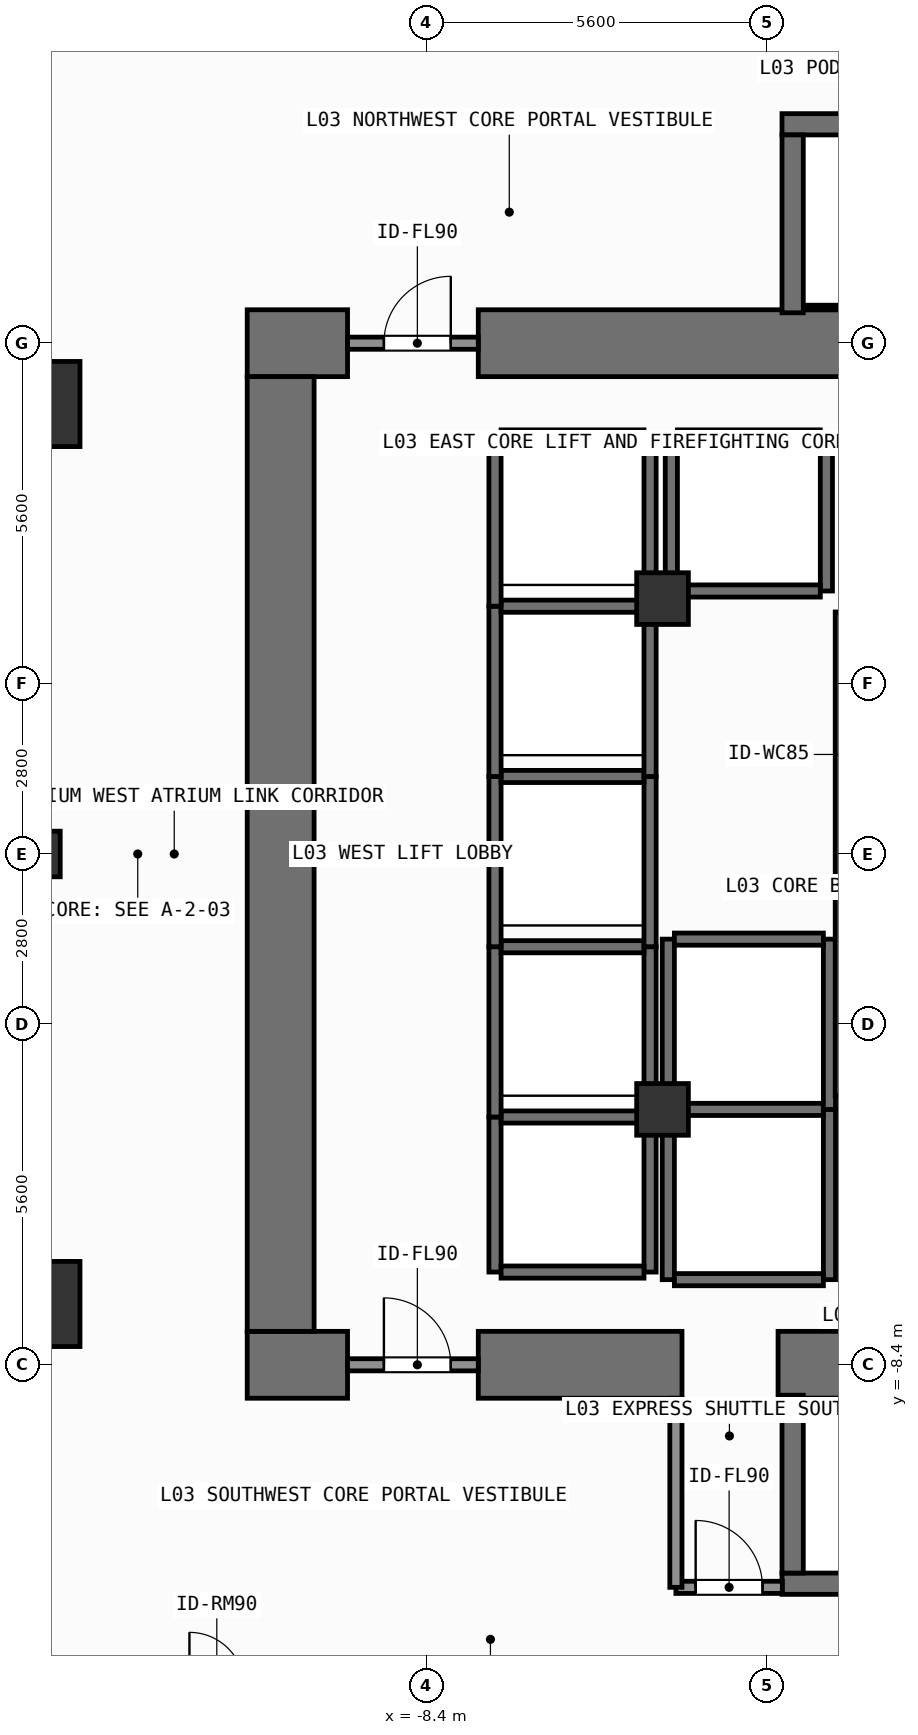
"""IFC4 building model, lengths in metres.
Left out: names, types, materials, properties, quantities, classifications, styles, units other than length and angle.
Written with IfcOpenShell. Run it as: python <this file> out.ifc"""

import sys

from ifc_helpers import new_model, si_unit, direction, frame, frame_2d, origin, origin_2d, place, context, subcontext, project, spatial, rectangle, extrude, element, fill, save


model = new_model("IFC4")
c1 = context("Model", 3, precision=1e-05, world=origin(), true_north=direction((0.0, 1.0)))
c2 = subcontext(c1, "Body", "Model", "MODEL_VIEW")
j1 = project(units=[si_unit("LENGTHUNIT", "METRE"), si_unit("PLANEANGLEUNIT", "RADIAN")], contexts=[c1])
p1 = place(None, origin())
s1 = spatial("IfcSite", under=j1, at=p1, CompositionType="ELEMENT")
p2 = place(p1, origin())
s2 = spatial("IfcBuilding", under=s1, at=p2, CompositionType="ELEMENT")
p3 = place(p2, frame((0.0, 0.0, 9.0)))
s3 = spatial("IfcBuildingStorey", under=s2, at=p3, CompositionType="ELEMENT", Elevation=9.0)
p4 = place(p3, frame((-11.35, -8.4, 0.0), z_axis=(0.0, 0.0, 1.0), x_axis=(1.0, 0.0, 0.0)))
e1 = element("IfcWall", 1, at=p4, inside=s3, PredefinedType="SHEAR", context=c2, shape_type="SweptSolid", body=[
    extrude(rectangle(XDim=1.65, YDim=1.1, at=frame_2d((0.825, 0.0))), origin(), (0.0, 0.0, 1.0), 4.2),
])
p5 = place(p3, frame((-7.55, -8.4, 0.0), z_axis=(0.0, 0.0, 1.0), x_axis=(1.0, 0.0, 0.0)))
e2 = element("IfcWall", 2, at=p5, inside=s3, PredefinedType="SHEAR", context=c2, shape_type="SweptSolid", body=[
    extrude(rectangle(XDim=3.35, YDim=1.1, at=frame_2d((1.675, 0.0))), origin(), (0.0, 0.0, 1.0), 4.2),
])
p6 = place(p3, frame((-2.62, -8.4, 0.0), z_axis=(0.0, 0.0, 1.0), x_axis=(1.0, 0.0, 0.0)))
e3 = element("IfcWall", 3, at=p6, inside=s3, PredefinedType="SHEAR", context=c2, shape_type="SweptSolid", body=[
    extrude(rectangle(XDim=7.27, YDim=1.1, at=frame_2d((3.635, 0.0))), origin(), (0.0, 0.0, 1.0), 4.2),
])
p7 = place(p3, frame((-11.35, 8.4, 0.0), z_axis=(0.0, 0.0, 1.0), x_axis=(1.0, 0.0, 0.0)))
e4 = element("IfcWall", 4, at=p7, inside=s3, PredefinedType="SHEAR", context=c2, shape_type="SweptSolid", body=[
    extrude(rectangle(XDim=1.65, YDim=1.1, at=frame_2d((0.825, 0.0))), origin(), (0.0, 0.0, 1.0), 4.2),
])
p8 = place(p3, frame((-7.55, 8.4, 0.0), z_axis=(0.0, 0.0, 1.0), x_axis=(1.0, 0.0, 0.0)))
e5 = element("IfcWall", 5, at=p8, inside=s3, PredefinedType="SHEAR", context=c2, shape_type="SweptSolid", body=[
    extrude(rectangle(XDim=16.5, YDim=1.1, at=frame_2d((8.25, 0.0))), origin(), (0.0, 0.0, 1.0), 4.2),
])
p9 = place(p3, frame((-10.8, -7.85, 0.0), z_axis=(0.0, 0.0, 1.0), x_axis=(0.0, 1.0, 0.0)))
e6 = element("IfcWall", 6, at=p9, inside=s3, PredefinedType="SHEAR", context=c2, shape_type="SweptSolid", body=[
    extrude(rectangle(XDim=15.7, YDim=1.1, at=frame_2d((7.85, 0.0))), origin(), (0.0, 0.0, 1.0), 4.2),
])
p10 = place(p3, frame((-2.555, -12.0, 0.0), z_axis=(0.0, 0.0, 1.0), x_axis=(1.0, 0.0, 0.0)))
e7 = element("IfcWall", 7, at=p10, inside=s3, PredefinedType="SHEAR", context=c2, shape_type="SweptSolid", body=[
    extrude(rectangle(XDim=7.31, YDim=0.35, at=frame_2d((3.655, 0.0))), origin(), (0.0, 0.0, 1.0), 4.2),
])
p11 = place(p3, frame((-2.2, -8.988, 0.0), z_axis=(0.0, 0.0, 1.0), x_axis=(1.0, 0.0, 0.0)))
e8 = element("IfcWall", 8, at=p11, inside=s3, PredefinedType="SHEAR", context=c2, shape_type="SweptSolid", body=[
    extrude(rectangle(XDim=6.6, YDim=0.075, at=frame_2d((3.3, 0.0))), origin(), (0.0, 0.0, 1.0), 4.2),
])
p12 = place(p3, frame((-2.38, -11.825, 0.0), z_axis=(0.0, 0.0, 1.0), x_axis=(0.0, 1.0, 0.0)))
e9 = element("IfcWall", 9, at=p12, inside=s3, PredefinedType="SHEAR", context=c2, shape_type="SweptSolid", body=[
    extrude(rectangle(XDim=2.925, YDim=0.35, at=frame_2d((1.462, 0.0))), origin(), (0.0, 0.0, 1.0), 4.2),
])
p13 = place(p3, frame((-2.555, 12.0, 0.0), z_axis=(0.0, 0.0, 1.0), x_axis=(1.0, 0.0, 0.0)))
e10 = element("IfcWall", 10, at=p13, inside=s3, PredefinedType="SHEAR", context=c2, shape_type="SweptSolid", body=[
    extrude(rectangle(XDim=7.31, YDim=0.35, at=frame_2d((3.655, 0.0))), origin(), (0.0, 0.0, 1.0), 4.2),
])
p14 = place(p3, frame((-2.2, 8.988, 0.0), z_axis=(0.0, 0.0, 1.0), x_axis=(1.0, 0.0, 0.0)))
e11 = element("IfcWall", 11, at=p14, inside=s3, PredefinedType="SHEAR", context=c2, shape_type="SweptSolid", body=[
    extrude(rectangle(XDim=6.6, YDim=0.075, at=frame_2d((3.3, 0.0))), origin(), (0.0, 0.0, 1.0), 4.2),
])
p15 = place(p3, frame((-2.38, 8.9, 0.0), z_axis=(0.0, 0.0, 1.0), x_axis=(0.0, 1.0, 0.0)))
e12 = element("IfcWall", 12, at=p15, inside=s3, PredefinedType="SHEAR", context=c2, shape_type="SweptSolid", body=[
    extrude(rectangle(XDim=2.925, YDim=0.35, at=frame_2d((1.462, 0.0))), origin(), (0.0, 0.0, 1.0), 4.2),
])
for number, where, z_axis, x_axis in (
    (13, (-14.8, -7.4, 0.0), (0.0, 0.0, 1.0), (1.0, 0.0, 0.0)),
    (14, (-14.8, 7.4, 0.0), (0.0, 0.0, 1.0), (1.0, 0.0, 0.0)),
):
    element("IfcColumn", number, at=place(p3, frame(where, z_axis=z_axis, x_axis=x_axis)), inside=s3, PredefinedType="COLUMN", context=c2, shape_type="SweptSolid", body=[
        extrude(rectangle(XDim=1.4, YDim=1.4, at=origin_2d()), origin(), (0.0, 0.0, 1.0), 4.2),
    ])
for number, where, z_axis, x_axis in (
    (15, (-4.52, -4.2, 0.0), (0.0, 0.0, 1.0), (1.0, 0.0, 0.0)),
    (16, (-4.52, 4.2, 0.0), (0.0, 0.0, 1.0), (1.0, 0.0, 0.0)),
):
    element("IfcColumn", number, at=place(p3, frame(where, z_axis=z_axis, x_axis=x_axis)), inside=s3, PredefinedType="COLUMN", context=c2, shape_type="SweptSolid", body=[
        extrude(rectangle(XDim=0.85, YDim=0.85, at=origin_2d()), origin(), (0.0, 0.0, 1.0), 4.2),
    ])
p16 = place(p3, frame((-14.8, 0.0, 0.0), z_axis=(0.0, 0.0, 1.0), x_axis=(1.0, 0.0, 0.0)))
e17 = element("IfcColumn", 17, at=p16, inside=s3, PredefinedType="COLUMN", context=c2, shape_type="SweptSolid", body=[
    extrude(rectangle(XDim=0.75, YDim=0.75, at=origin_2d()), origin(), (0.0, 0.0, 1.0), 4.2),
])
for number, where, z_axis, x_axis in (
    (18, (-7.275, -6.875, 0.0), (0.0, 0.0, 1.0), (0.0, 1.0, 0.0)),
    (19, (-4.725, -6.875, 0.0), (0.0, 0.0, 1.0), (0.0, 1.0, 0.0)),
):
    element("IfcWall", number, at=place(p3, frame(where, z_axis=z_axis, x_axis=x_axis)), inside=s3, PredefinedType="SHEAR", context=c2, shape_type="SweptSolid", body=[
        extrude(rectangle(XDim=2.55, YDim=0.2, at=frame_2d((1.275, 0.0))), origin(), (0.0, 0.0, 1.0), 3.96),
    ])
for number, where, z_axis, x_axis in (
    (20, (-7.175, -6.875, 0.0), (0.0, 0.0, 1.0), (1.0, 0.0, 0.0)),
    (21, (-7.175, -4.325, 0.0), (0.0, 0.0, 1.0), (1.0, 0.0, 0.0)),
):
    element("IfcWall", number, at=place(p3, frame(where, z_axis=z_axis, x_axis=x_axis)), inside=s3, PredefinedType="SHEAR", context=c2, shape_type="SweptSolid", body=[
        extrude(rectangle(XDim=2.35, YDim=0.2, at=frame_2d((1.175, 0.0))), origin(), (0.0, 0.0, 1.0), 3.96),
    ])
for number, where, z_axis, x_axis in (
    (22, (-7.275, -4.325, 0.0), (0.0, 0.0, 1.0), (0.0, 1.0, 0.0)),
    (23, (-4.725, -4.325, 0.0), (0.0, 0.0, 1.0), (0.0, 1.0, 0.0)),
):
    element("IfcWall", number, at=place(p3, frame(where, z_axis=z_axis, x_axis=x_axis)), inside=s3, PredefinedType="SHEAR", context=c2, shape_type="SweptSolid", body=[
        extrude(rectangle(XDim=2.8, YDim=0.2, at=frame_2d((1.4, 0.0))), origin(), (0.0, 0.0, 1.0), 3.96),
    ])
p17 = place(p3, frame((-7.175, -1.525, 0.0), z_axis=(0.0, 0.0, 1.0), x_axis=(1.0, 0.0, 0.0)))
e24 = element("IfcWall", 24, at=p17, inside=s3, PredefinedType="SHEAR", context=c2, shape_type="SweptSolid", body=[
    extrude(rectangle(XDim=2.35, YDim=0.2, at=frame_2d((1.175, 0.0))), origin(), (0.0, 0.0, 1.0), 3.96),
])
for number, where, z_axis, x_axis in (
    (25, (-7.275, -1.525, 0.0), (0.0, 0.0, 1.0), (0.0, 1.0, 0.0)),
    (26, (-4.725, -1.525, 0.0), (0.0, 0.0, 1.0), (0.0, 1.0, 0.0)),
):
    element("IfcWall", number, at=place(p3, frame(where, z_axis=z_axis, x_axis=x_axis)), inside=s3, PredefinedType="SHEAR", context=c2, shape_type="SweptSolid", body=[
        extrude(rectangle(XDim=2.8, YDim=0.2, at=frame_2d((1.4, 0.0))), origin(), (0.0, 0.0, 1.0), 3.96),
    ])
p18 = place(p3, frame((-7.175, 1.275, 0.0), z_axis=(0.0, 0.0, 1.0), x_axis=(1.0, 0.0, 0.0)))
e27 = element("IfcWall", 27, at=p18, inside=s3, PredefinedType="SHEAR", context=c2, shape_type="SweptSolid", body=[
    extrude(rectangle(XDim=2.35, YDim=0.2, at=frame_2d((1.175, 0.0))), origin(), (0.0, 0.0, 1.0), 3.96),
])
for number, where, z_axis, x_axis in (
    (28, (-7.275, 1.275, 0.0), (0.0, 0.0, 1.0), (0.0, 1.0, 0.0)),
    (29, (-4.725, 1.275, 0.0), (0.0, 0.0, 1.0), (0.0, 1.0, 0.0)),
):
    element("IfcWall", number, at=place(p3, frame(where, z_axis=z_axis, x_axis=x_axis)), inside=s3, PredefinedType="SHEAR", context=c2, shape_type="SweptSolid", body=[
        extrude(rectangle(XDim=2.8, YDim=0.2, at=frame_2d((1.4, 0.0))), origin(), (0.0, 0.0, 1.0), 3.96),
    ])
p19 = place(p3, frame((-7.175, 4.075, 0.0), z_axis=(0.0, 0.0, 1.0), x_axis=(1.0, 0.0, 0.0)))
e30 = element("IfcWall", 30, at=p19, inside=s3, PredefinedType="SHEAR", context=c2, shape_type="SweptSolid", body=[
    extrude(rectangle(XDim=2.35, YDim=0.2, at=frame_2d((1.175, 0.0))), origin(), (0.0, 0.0, 1.0), 3.96),
])
for number, where, z_axis, x_axis in (
    (31, (-7.275, 4.075, 0.0), (0.0, 0.0, 1.0), (0.0, 1.0, 0.0)),
    (32, (-4.725, 4.075, 0.0), (0.0, 0.0, 1.0), (0.0, 1.0, 0.0)),
):
    element("IfcWall", number, at=place(p3, frame(where, z_axis=z_axis, x_axis=x_axis)), inside=s3, PredefinedType="SHEAR", context=c2, shape_type="SweptSolid", body=[
        extrude(rectangle(XDim=2.8, YDim=0.2, at=frame_2d((1.4, 0.0))), origin(), (0.0, 0.0, 1.0), 3.96),
    ])
p20 = place(p3, frame((-7.175, 6.875, 0.0), z_axis=(0.0, 0.0, 1.0), x_axis=(1.0, 0.0, 0.0)))
e33 = element("IfcWall", 33, at=p20, inside=s3, PredefinedType="SHEAR", context=c2, shape_type="SweptSolid", body=[
    extrude(rectangle(XDim=2.35, YDim=0.2, at=frame_2d((1.175, 0.0))), origin(), (0.0, 0.0, 1.0), 3.96),
])
for number, where, z_axis, x_axis in (
    (34, (-4.375, 4.325, 0.0), (0.0, 0.0, 1.0), (0.0, 1.0, 0.0)),
    (35, (-1.825, 4.325, 0.0), (0.0, 0.0, 1.0), (0.0, 1.0, 0.0)),
):
    element("IfcWall", number, at=place(p3, frame(where, z_axis=z_axis, x_axis=x_axis)), inside=s3, PredefinedType="SHEAR", context=c2, shape_type="SweptSolid", body=[
        extrude(rectangle(XDim=2.55, YDim=0.2, at=frame_2d((1.275, 0.0))), origin(), (0.0, 0.0, 1.0), 3.96),
    ])
for number, where, z_axis, x_axis in (
    (36, (-4.275, 4.325, 0.0), (0.0, 0.0, 1.0), (1.0, 0.0, 0.0)),
    (37, (-4.275, 6.875, 0.0), (0.0, 0.0, 1.0), (1.0, 0.0, 0.0)),
):
    element("IfcWall", number, at=place(p3, frame(where, z_axis=z_axis, x_axis=x_axis)), inside=s3, PredefinedType="SHEAR", context=c2, shape_type="SweptSolid", body=[
        extrude(rectangle(XDim=2.35, YDim=0.2, at=frame_2d((1.175, 0.0))), origin(), (0.0, 0.0, 1.0), 3.96),
    ])
for number, where, z_axis, x_axis in (
    (38, (-4.425, -7.0, 0.0), (0.0, 0.0, 1.0), (0.0, 1.0, 0.0)),
    (39, (-1.775, -7.0, 0.0), (0.0, 0.0, 1.0), (0.0, 1.0, 0.0)),
):
    element("IfcWall", number, at=place(p3, frame(where, z_axis=z_axis, x_axis=x_axis)), inside=s3, PredefinedType="SHEAR", context=c2, shape_type="SweptSolid", body=[
        extrude(rectangle(XDim=2.8, YDim=0.2, at=frame_2d((1.4, 0.0))), origin(), (0.0, 0.0, 1.0), 3.96),
    ])
for number, where, z_axis, x_axis in (
    (40, (-4.325, -7.0, 0.0), (0.0, 0.0, 1.0), (1.0, 0.0, 0.0)),
    (41, (-4.325, -4.2, 0.0), (0.0, 0.0, 1.0), (1.0, 0.0, 0.0)),
):
    element("IfcWall", number, at=place(p3, frame(where, z_axis=z_axis, x_axis=x_axis)), inside=s3, PredefinedType="SHEAR", context=c2, shape_type="SweptSolid", body=[
        extrude(rectangle(XDim=2.45, YDim=0.2, at=frame_2d((1.225, 0.0))), origin(), (0.0, 0.0, 1.0), 3.96),
    ])
for number, where, z_axis, x_axis in (
    (42, (-4.425, -4.2, 0.0), (0.0, 0.0, 1.0), (0.0, 1.0, 0.0)),
    (43, (-1.775, -4.2, 0.0), (0.0, 0.0, 1.0), (0.0, 1.0, 0.0)),
):
    element("IfcWall", number, at=place(p3, frame(where, z_axis=z_axis, x_axis=x_axis)), inside=s3, PredefinedType="SHEAR", context=c2, shape_type="SweptSolid", body=[
        extrude(rectangle(XDim=2.8, YDim=0.2, at=frame_2d((1.4, 0.0))), origin(), (0.0, 0.0, 1.0), 3.96),
    ])
p21 = place(p3, frame((-4.325, -1.4, 0.0), z_axis=(0.0, 0.0, 1.0), x_axis=(1.0, 0.0, 0.0)))
e44 = element("IfcWall", 44, at=p21, inside=s3, PredefinedType="SHEAR", context=c2, shape_type="SweptSolid", body=[
    extrude(rectangle(XDim=2.45, YDim=0.2, at=frame_2d((1.225, 0.0))), origin(), (0.0, 0.0, 1.0), 3.96),
])
p22 = place(p3, frame((-9.7, -8.4, 0.0), z_axis=(0.0, 0.0, 1.0), x_axis=(1.0, 0.0, 0.0)))
e45 = element("IfcWall", 45, at=p22, inside=s3, PredefinedType="SOLIDWALL", context=c2, shape_type="SweptSolid", body=[
    extrude(rectangle(XDim=2.15, YDim=0.2, at=frame_2d((1.075, 0.0))), origin(), (0.0, 0.0, 1.0), 3.0),
])
p23 = place(p22, frame((0.598, 0.0, 0.0)))
e46 = element("IfcOpeningElement", 46, at=p23, cuts=e45, PredefinedType="OPENING", context=c2, shape_type="SweptSolid", body=[
    extrude(rectangle(XDim=1.1, YDim=2.15, at=frame_2d((0.55, 1.075))), frame((0.0, 0.11, 0.0), z_axis=(0.0, -1.0, 0.0), x_axis=(1.0, 0.0, 0.0)), (0.0, 0.0, 1.0), 0.22),
])
p24 = place(p3, frame((-9.7, 8.4, 0.0), z_axis=(0.0, 0.0, 1.0), x_axis=(1.0, 0.0, 0.0)))
e47 = element("IfcWall", 47, at=p24, inside=s3, PredefinedType="SOLIDWALL", context=c2, shape_type="SweptSolid", body=[
    extrude(rectangle(XDim=2.15, YDim=0.2, at=frame_2d((1.075, 0.0))), origin(), (0.0, 0.0, 1.0), 3.0),
])
p25 = place(p24, frame((0.598, 0.0, 0.0)))
e48 = element("IfcOpeningElement", 48, at=p25, cuts=e47, PredefinedType="OPENING", context=c2, shape_type="SweptSolid", body=[
    extrude(rectangle(XDim=1.1, YDim=2.15, at=frame_2d((0.55, 1.075))), frame((0.0, 0.11, 0.0), z_axis=(0.0, -1.0, 0.0), x_axis=(1.0, 0.0, 0.0)), (0.0, 0.0, 1.0), 0.22),
])
p26 = place(p3, frame((-4.3, -12.06, 0.0), z_axis=(0.0, 0.0, 1.0), x_axis=(1.0, 0.0, 0.0)))
e49 = element("IfcWall", 49, at=p26, inside=s3, PredefinedType="SOLIDWALL", context=c2, shape_type="SweptSolid", body=[
    extrude(rectangle(XDim=1.75, YDim=0.2, at=frame_2d((0.875, 0.0))), origin(), (0.0, 0.0, 1.0), 3.96),
])
p27 = place(p26, frame((0.325, 0.0, 0.0)))
e50 = element("IfcOpeningElement", 50, at=p27, cuts=e49, PredefinedType="OPENING", context=c2, shape_type="SweptSolid", body=[
    extrude(rectangle(XDim=1.1, YDim=2.15, at=frame_2d((0.55, 1.075))), frame((0.0, 0.11, 0.0), z_axis=(0.0, -1.0, 0.0), x_axis=(1.0, 0.0, 0.0)), (0.0, 0.0, 1.0), 0.22),
])
p28 = place(p3, frame((-4.3, -12.06, 0.0), z_axis=(0.0, 0.0, 1.0), x_axis=(0.0, 1.0, 0.0)))
e51 = element("IfcWall", 51, at=p28, inside=s3, PredefinedType="SOLIDWALL", context=c2, shape_type="SweptSolid", body=[
    extrude(rectangle(XDim=3.11, YDim=0.2, at=frame_2d((1.555, 0.0))), origin(), (0.0, 0.0, 1.0), 3.96),
])
p29 = place(p3, frame((-1.58, -3.98, 0.0), z_axis=(0.0, 0.0, 1.0), x_axis=(0.0, 1.0, 0.0)))
e52 = element("IfcWall", 52, at=p29, inside=s3, PredefinedType="SOLIDWALL", context=c2, shape_type="SweptSolid", body=[
    extrude(rectangle(XDim=7.96, YDim=0.2, at=frame_2d((3.98, 0.0))), origin(), (0.0, 0.0, 1.0), 3.96),
])
p30 = place(p23, origin())
e53 = element("IfcDoor", 53, at=p30, inside=s3, OperationType="SINGLE_SWING_LEFT", PredefinedType="DOOR", context=c2, shape_type="SweptSolid", body=[
    extrude(rectangle(XDim=1.1, YDim=2.15, at=frame_2d((0.55, 1.075))), frame((0.0, 0.025, 0.0), z_axis=(0.0, -1.0, 0.0), x_axis=(1.0, 0.0, 0.0)), (0.0, 0.0, 1.0), 0.05),
])
fill(e46, e53)
p31 = place(p25, origin())
e54 = element("IfcDoor", 54, at=p31, inside=s3, OperationType="SINGLE_SWING_RIGHT", PredefinedType="DOOR", context=c2, shape_type="SweptSolid", body=[
    extrude(rectangle(XDim=1.1, YDim=2.15, at=frame_2d((0.55, 1.075))), frame((0.0, 0.025, 0.0), z_axis=(0.0, -1.0, 0.0), x_axis=(1.0, 0.0, 0.0)), (0.0, 0.0, 1.0), 0.05),
])
fill(e48, e54)
p32 = place(p27, origin())
e55 = element("IfcDoor", 55, at=p32, inside=s3, OperationType="SINGLE_SWING_LEFT", PredefinedType="DOOR", context=c2, shape_type="SweptSolid", body=[
    extrude(rectangle(XDim=1.1, YDim=2.15, at=frame_2d((0.55, 1.075))), frame((0.0, 0.025, 0.0), z_axis=(0.0, -1.0, 0.0), x_axis=(1.0, 0.0, 0.0)), (0.0, 0.0, 1.0), 0.05),
])
fill(e50, e55)
save(model, sys.argv[1])
